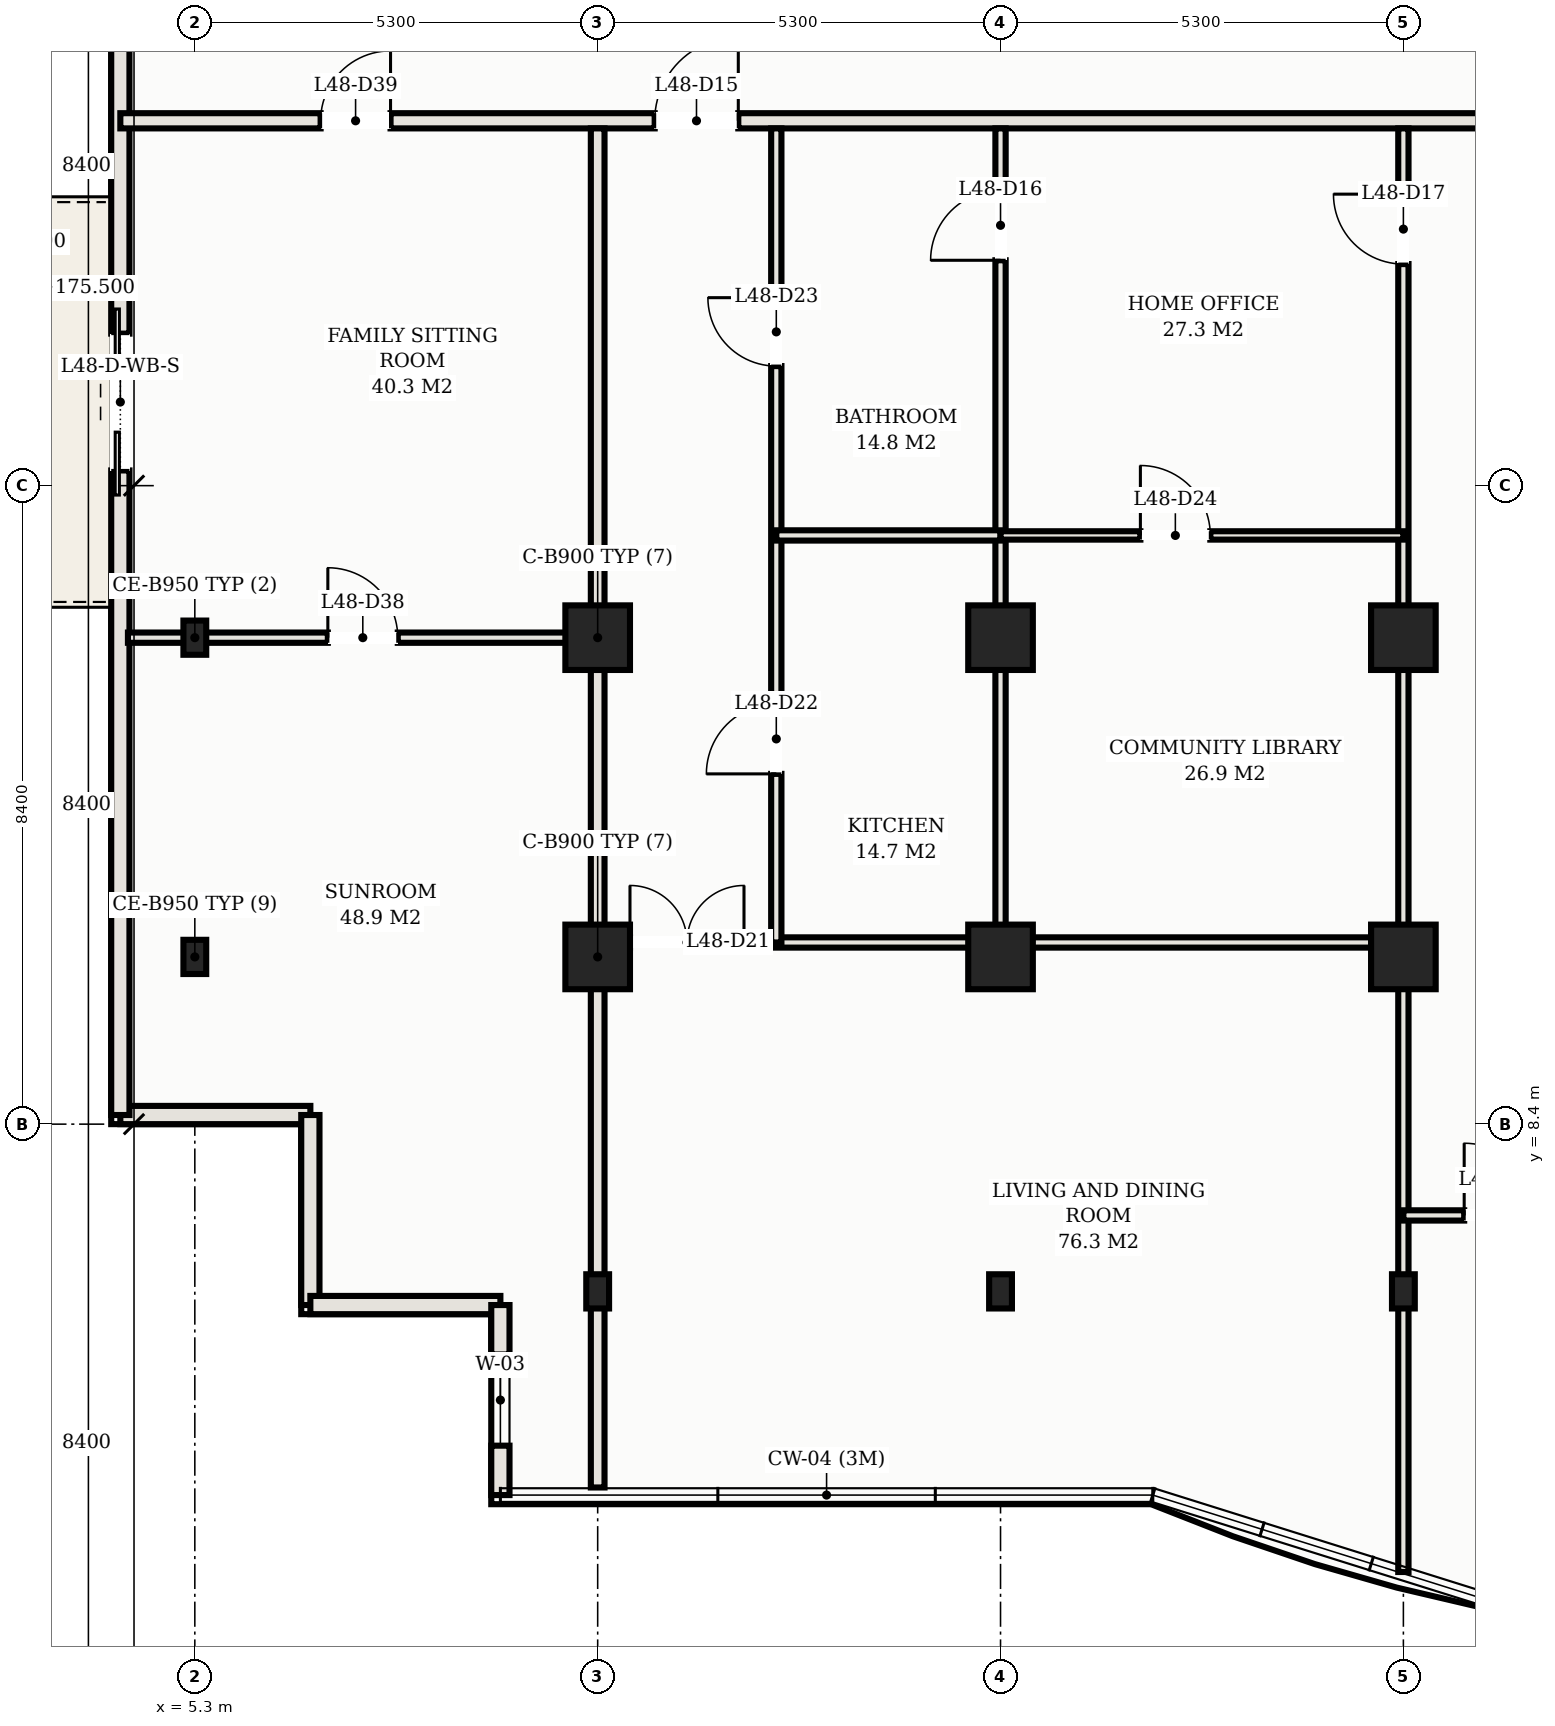
"""IFC4 building model, lengths in metres.
Left out: names, types, materials, properties, quantities, classifications, styles, units other than length and angle.
Written with IfcOpenShell. Run it as: python <this file> out.ifc"""

import sys

from ifc_helpers import new_model, si_unit, direction, frame, frame_2d, origin, origin_2d, place, context, subcontext, project, spatial, rectangle, hollow_rectangle, extrude, element, fill, save


model = new_model("IFC4")
c1 = context("Model", 3, precision=1e-05, world=origin(), true_north=direction((0.0, 1.0)))
c2 = subcontext(c1, "Body", "Model", "MODEL_VIEW")
j1 = project(units=[si_unit("LENGTHUNIT", "METRE"), si_unit("PLANEANGLEUNIT", "RADIAN")], contexts=[c1])
p1 = place(None, origin())
s1 = spatial("IfcSite", under=j1, at=p1, CompositionType="ELEMENT")
p2 = place(p1, origin())
s2 = spatial("IfcBuilding", under=s1, at=p2, CompositionType="ELEMENT")
p3 = place(p2, frame((0.0, 0.0, 175.5)))
s3 = spatial("IfcBuildingStorey", under=s2, at=p3, CompositionType="ELEMENT", Elevation=175.5)
for number, where, z_axis, x_axis in (
    (1, (10.6, 14.8, 0.0), (0.0, 0.0, 1.0), (1.0, 0.0, 0.0)),
    (2, (10.6, 10.6, 0.0), (0.0, 0.0, 1.0), (1.0, 0.0, 0.0)),
    (3, (15.9, 14.8, 0.0), (0.0, 0.0, 1.0), (1.0, 0.0, 0.0)),
    (4, (15.9, 10.6, 0.0), (0.0, 0.0, 1.0), (1.0, 0.0, 0.0)),
    (5, (21.2, 14.8, 0.0), (0.0, 0.0, 1.0), (1.0, 0.0, 0.0)),
    (6, (21.2, 10.6, 0.0), (0.0, 0.0, 1.0), (1.0, 0.0, 0.0)),
):
    element("IfcColumn", number, at=place(p3, frame(where, z_axis=z_axis, x_axis=x_axis)), inside=s3, PredefinedType="COLUMN", context=c2, shape_type="SweptSolid", body=[
        extrude(hollow_rectangle(XDim=0.85, YDim=0.85, WallThickness=0.028, at=origin_2d()), origin(), (0.0, 0.0, 1.0), 3.3),
    ])
for number, where, z_axis, x_axis in (
    (7, (10.6, 6.2, 0.0), (0.0, 0.0, 1.0), (1.0, 0.0, 0.0)),
    (8, (15.9, 6.2, 0.0), (0.0, 0.0, 1.0), (1.0, 0.0, 0.0)),
    (9, (21.2, 6.2, 0.0), (0.0, 0.0, 1.0), (1.0, 0.0, 0.0)),
    (10, (5.3, 10.6, 0.0), (0.0, 0.0, 1.0), (1.0, 0.0, 0.0)),
    (11, (5.3, 14.8, 0.0), (0.0, 0.0, 1.0), (1.0, 0.0, 0.0)),
):
    element("IfcColumn", number, at=place(p3, frame(where, z_axis=z_axis, x_axis=x_axis)), inside=s3, PredefinedType="COLUMN", context=c2, shape_type="SweptSolid", body=[
        extrude(hollow_rectangle(XDim=0.3, YDim=0.45, WallThickness=0.016, at=origin_2d()), origin(), (0.0, 0.0, 1.0), 3.3),
    ])
for number, where, z_axis, x_axis in (
    (12, (4.32, 8.52, 0.0), (0.0, 0.0, 1.0), (1.0, 0.0, 0.0)),
    (13, (6.82, 8.52, 0.0), (0.0, 0.0, 1.0), (0.0, -1.0, 0.0)),
    (14, (6.82, 6.02, 0.0), (0.0, 0.0, 1.0), (1.0, 0.0, 0.0)),
):
    element("IfcWall", number, at=place(p3, frame(where, z_axis=z_axis, x_axis=x_axis)), inside=s3, PredefinedType="SOLIDWALL", context=c2, shape_type="SweptSolid", body=[
        extrude(rectangle(XDim=2.5, YDim=0.24, at=frame_2d((1.25, 0.0))), origin(), (0.0, 0.0, 1.0), 3.1),
    ])
p4 = place(p3, frame((9.32, 6.02, 0.0), z_axis=(0.0, 0.0, 1.0), x_axis=(0.0, -1.0, 0.0)))
e15 = element("IfcWall", 15, at=p4, inside=s3, PredefinedType="SOLIDWALL", context=c2, shape_type="SweptSolid", body=[
    extrude(rectangle(XDim=2.5, YDim=0.24, at=frame_2d((1.25, 0.0))), origin(), (0.0, 0.0, 1.0), 3.1),
])
p5 = place(p4, frame((0.65, 0.0, 0.75)))
e16 = element("IfcOpeningElement", 16, at=p5, cuts=e15, PredefinedType="OPENING", context=c2, shape_type="SweptSolid", body=[
    extrude(rectangle(XDim=1.2, YDim=1.5, at=frame_2d((0.6, 0.75))), frame((0.0, 0.13, 0.0), z_axis=(0.0, -1.0, 0.0), x_axis=(1.0, 0.0, 0.0)), (0.0, 0.0, 1.0), 0.26),
])
p6 = place(p3, frame((4.32, 35.93, 0.0), z_axis=(0.0, 0.0, 1.0), x_axis=(0.0, -1.0, 0.0)))
e17 = element("IfcWall", 17, at=p6, inside=s3, PredefinedType="SOLIDWALL", context=c2, shape_type="SweptSolid", body=[
    extrude(rectangle(XDim=27.41, YDim=0.24, at=frame_2d((13.705, 0.0))), origin(), (0.0, 0.0, 1.0), 3.1),
])
p7 = place(p6, frame((17.13, 0.0, 0.0)))
e18 = element("IfcOpeningElement", 18, at=p7, cuts=e17, PredefinedType="OPENING", context=c2, shape_type="SweptSolid", body=[
    extrude(rectangle(XDim=1.8, YDim=2.2, at=frame_2d((0.9, 1.1))), frame((0.0, 0.13, 0.0), z_axis=(0.0, -1.0, 0.0), x_axis=(1.0, 0.0, 0.0)), (0.0, 0.0, 1.0), 0.26),
])
p8 = place(p3, frame((4.32, 21.6, 0.0), z_axis=(0.0, 0.0, 1.0), x_axis=(1.0, 0.0, 0.0)))
e19 = element("IfcWall", 19, at=p8, inside=s3, PredefinedType="PARTITIONING", context=c2, shape_type="SweptSolid", body=[
    extrude(rectangle(XDim=44.36, YDim=0.2, at=frame_2d((22.18, 0.0))), origin(), (0.0, 0.0, 1.0), 2.38),
])
p9 = place(p8, frame((7.03, 0.0, 0.0)))
e20 = element("IfcOpeningElement", 20, at=p9, cuts=e19, PredefinedType="OPENING", context=c2, shape_type="SweptSolid", body=[
    extrude(rectangle(XDim=1.1, YDim=2.25, at=frame_2d((0.55, 1.125))), frame((0.0, 0.11, 0.0), z_axis=(0.0, -1.0, 0.0), x_axis=(1.0, 0.0, 0.0)), (0.0, 0.0, 1.0), 0.22),
])
p10 = place(p8, frame((2.635, 0.0, 0.0)))
e21 = element("IfcOpeningElement", 21, at=p10, cuts=e19, PredefinedType="OPENING", context=c2, shape_type="SweptSolid", body=[
    extrude(rectangle(XDim=0.92, YDim=2.15, at=frame_2d((0.46, 1.075))), frame((0.0, 0.11, 0.0), z_axis=(0.0, -1.0, 0.0), x_axis=(1.0, 0.0, 0.0)), (0.0, 0.0, 1.0), 0.22),
])
p11 = place(p8, frame((40.805, 0.0, 0.0)))
e22 = element("IfcOpeningElement", 22, at=p11, cuts=e19, PredefinedType="OPENING", context=c2, shape_type="SweptSolid", body=[
    extrude(rectangle(XDim=0.92, YDim=2.15, at=frame_2d((0.46, 1.075))), frame((0.0, 0.11, 0.0), z_axis=(0.0, -1.0, 0.0), x_axis=(1.0, 0.0, 0.0)), (0.0, 0.0, 1.0), 0.22),
])
p12 = place(p3, frame((10.6, 3.62, 0.0), z_axis=(0.0, 0.0, 1.0), x_axis=(0.0, 1.0, 0.0)))
e23 = element("IfcWall", 23, at=p12, inside=s3, PredefinedType="PARTITIONING", context=c2, shape_type="SweptSolid", body=[
    extrude(rectangle(XDim=17.88, YDim=0.18, at=frame_2d((8.94, 0.0))), origin(), (0.0, 0.0, 1.0), 2.38),
])
p13 = place(p3, frame((15.9, 14.8, 0.0), z_axis=(0.0, 0.0, 1.0), x_axis=(0.0, 1.0, 0.0)))
e24 = element("IfcWall", 24, at=p13, inside=s3, PredefinedType="PARTITIONING", context=c2, shape_type="SweptSolid", body=[
    extrude(rectangle(XDim=6.7, YDim=0.135, at=frame_2d((3.35, 0.0))), origin(), (0.0, 0.0, 1.0), 2.38),
])
p14 = place(p13, frame((4.965, 0.0, 0.0)))
e25 = element("IfcOpeningElement", 25, at=p14, cuts=e24, PredefinedType="OPENING", context=c2, shape_type="SweptSolid", body=[
    extrude(rectangle(XDim=0.92, YDim=2.15, at=frame_2d((0.46, 1.075))), frame((0.0, 0.078, 0.0), z_axis=(0.0, -1.0, 0.0), x_axis=(1.0, 0.0, 0.0)), (0.0, 0.0, 1.0), 0.155),
])
p15 = place(p3, frame((21.2, 2.508, 0.0), z_axis=(0.0, 0.0, 1.0), x_axis=(0.0, 1.0, 0.0)))
e26 = element("IfcWall", 26, at=p15, inside=s3, PredefinedType="PARTITIONING", context=c2, shape_type="SweptSolid", body=[
    extrude(rectangle(XDim=18.992, YDim=0.135, at=frame_2d((9.496, 0.0))), origin(), (0.0, 0.0, 1.0), 2.38),
])
p16 = place(p15, frame((17.207, 0.0, 0.0)))
e27 = element("IfcOpeningElement", 27, at=p16, cuts=e26, PredefinedType="OPENING", context=c2, shape_type="SweptSolid", body=[
    extrude(rectangle(XDim=0.92, YDim=2.15, at=frame_2d((0.46, 1.075))), frame((0.0, 0.078, 0.0), z_axis=(0.0, -1.0, 0.0), x_axis=(1.0, 0.0, 0.0)), (0.0, 0.0, 1.0), 0.155),
])
p17 = place(p3, frame((15.9, 10.79, 0.0), z_axis=(0.0, 0.0, 1.0), x_axis=(0.0, 1.0, 0.0)))
e28 = element("IfcWall", 28, at=p17, inside=s3, PredefinedType="PARTITIONING", context=c2, shape_type="SweptSolid", body=[
    extrude(rectangle(XDim=4.01, YDim=0.135, at=frame_2d((2.005, 0.0))), origin(), (0.0, 0.0, 1.0), 2.38),
])
p18 = place(p3, frame((10.6, 10.79, 0.0), z_axis=(0.0, 0.0, 1.0), x_axis=(1.0, 0.0, 0.0)))
e29 = element("IfcWall", 29, at=p18, inside=s3, PredefinedType="PARTITIONING", context=c2, shape_type="SweptSolid", body=[
    extrude(rectangle(XDim=10.6, YDim=0.135, at=frame_2d((5.3, 0.0))), origin(), (0.0, 0.0, 1.0), 2.38),
])
p19 = place(p18, frame((0.425, 0.0, 0.0)))
e30 = element("IfcOpeningElement", 30, at=p19, cuts=e29, PredefinedType="OPENING", context=c2, shape_type="SweptSolid", body=[
    extrude(rectangle(XDim=1.5, YDim=2.25, at=frame_2d((0.75, 1.125))), frame((0.0, 0.078, 0.0), z_axis=(0.0, -1.0, 0.0), x_axis=(1.0, 0.0, 0.0)), (0.0, 0.0, 1.0), 0.155),
])
p20 = place(p3, frame((12.95, 10.79, 0.0), z_axis=(0.0, 0.0, 1.0), x_axis=(0.0, 1.0, 0.0)))
e31 = element("IfcWall", 31, at=p20, inside=s3, PredefinedType="PARTITIONING", context=c2, shape_type="SweptSolid", body=[
    extrude(rectangle(XDim=10.71, YDim=0.135, at=frame_2d((5.355, 0.0))), origin(), (0.0, 0.0, 1.0), 2.38),
])
p21 = place(p20, frame((2.218, 0.0, 0.0)))
e32 = element("IfcOpeningElement", 32, at=p21, cuts=e31, PredefinedType="OPENING", context=c2, shape_type="SweptSolid", body=[
    extrude(rectangle(XDim=0.92, YDim=2.15, at=frame_2d((0.46, 1.075))), frame((0.0, 0.078, 0.0), z_axis=(0.0, -1.0, 0.0), x_axis=(1.0, 0.0, 0.0)), (0.0, 0.0, 1.0), 0.155),
])
p22 = place(p20, frame((7.583, 0.0, 0.0)))
e33 = element("IfcOpeningElement", 33, at=p22, cuts=e31, PredefinedType="OPENING", context=c2, shape_type="SweptSolid", body=[
    extrude(rectangle(XDim=0.9, YDim=2.15, at=frame_2d((0.45, 1.075))), frame((0.0, 0.078, 0.0), z_axis=(0.0, -1.0, 0.0), x_axis=(1.0, 0.0, 0.0)), (0.0, 0.0, 1.0), 0.155),
])
p23 = place(p3, frame((12.95, 16.145, 0.0), z_axis=(0.0, 0.0, 1.0), x_axis=(1.0, 0.0, 0.0)))
e34 = element("IfcWall", 34, at=p23, inside=s3, PredefinedType="PARTITIONING", context=c2, shape_type="SweptSolid", body=[
    extrude(rectangle(XDim=2.95, YDim=0.135, at=frame_2d((1.475, 0.0))), origin(), (0.0, 0.0, 1.0), 2.38),
])
p24 = place(p3, frame((15.9, 16.145, 0.0), z_axis=(0.0, 0.0, 1.0), x_axis=(1.0, 0.0, 0.0)))
e35 = element("IfcWall", 35, at=p24, inside=s3, PredefinedType="MOVABLE", context=c2, shape_type="SweptSolid", body=[
    extrude(rectangle(XDim=5.3, YDim=0.11, at=frame_2d((2.65, 0.0))), origin(), (0.0, 0.0, 1.0), 2.38),
])
p25 = place(p24, frame((1.84, 0.0, 0.0)))
e36 = element("IfcOpeningElement", 36, at=p25, cuts=e35, PredefinedType="OPENING", context=c2, shape_type="SweptSolid", body=[
    extrude(rectangle(XDim=0.92, YDim=2.15, at=frame_2d((0.46, 1.075))), frame((0.0, 0.065, 0.0), z_axis=(0.0, -1.0, 0.0), x_axis=(1.0, 0.0, 0.0)), (0.0, 0.0, 1.0), 0.13),
])
p26 = place(p3, frame((21.2, 7.199, 0.0), z_axis=(0.0, 0.0, 1.0), x_axis=(1.0, 0.0, 0.0)))
e37 = element("IfcWall", 37, at=p26, inside=s3, PredefinedType="PARTITIONING", context=c2, shape_type="SweptSolid", body=[
    extrude(rectangle(XDim=5.3, YDim=0.135, at=frame_2d((2.65, 0.0))), origin(), (0.0, 0.0, 1.0), 2.38),
])
p27 = place(p26, frame((0.8, 0.0, 0.0)))
e38 = element("IfcOpeningElement", 38, at=p27, cuts=e37, PredefinedType="OPENING", context=c2, shape_type="SweptSolid", body=[
    extrude(rectangle(XDim=0.95, YDim=2.15, at=frame_2d((0.475, 1.075))), frame((0.0, 0.078, 0.0), z_axis=(0.0, -1.0, 0.0), x_axis=(1.0, 0.0, 0.0)), (0.0, 0.0, 1.0), 0.155),
])
p28 = place(p26, frame((3.075, 0.0, 0.0)))
e39 = element("IfcOpeningElement", 39, at=p28, cuts=e37, PredefinedType="OPENING", context=c2, shape_type="SweptSolid", body=[
    extrude(rectangle(XDim=0.9, YDim=2.15, at=frame_2d((0.45, 1.075))), frame((0.0, 0.078, 0.0), z_axis=(0.0, -1.0, 0.0), x_axis=(1.0, 0.0, 0.0)), (0.0, 0.0, 1.0), 0.155),
])
p29 = place(p3, frame((4.42, 14.8, 0.0), z_axis=(0.0, 0.0, 1.0), x_axis=(1.0, 0.0, 0.0)))
e40 = element("IfcWall", 40, at=p29, inside=s3, PredefinedType="PARTITIONING", context=c2, shape_type="SweptSolid", body=[
    extrude(rectangle(XDim=6.18, YDim=0.135, at=frame_2d((3.09, 0.0))), origin(), (0.0, 0.0, 1.0), 2.38),
])
p30 = place(p29, frame((2.63, 0.0, 0.0)))
e41 = element("IfcOpeningElement", 41, at=p30, cuts=e40, PredefinedType="OPENING", context=c2, shape_type="SweptSolid", body=[
    extrude(rectangle(XDim=0.92, YDim=2.15, at=frame_2d((0.46, 1.075))), frame((0.0, 0.078, 0.0), z_axis=(0.0, -1.0, 0.0), x_axis=(1.0, 0.0, 0.0)), (0.0, 0.0, 1.0), 0.155),
])
p31 = place(p5, origin())
e42 = element("IfcWindow", 42, at=p31, inside=s3, PartitioningType="SINGLE_PANEL", PredefinedType="WINDOW", context=c2, shape_type="SweptSolid", body=[
    extrude(rectangle(XDim=1.2, YDim=1.5, at=frame_2d((0.6, 0.75))), frame((0.0, 0.03, 0.0), z_axis=(0.0, -1.0, 0.0), x_axis=(1.0, 0.0, 0.0)), (0.0, 0.0, 1.0), 0.06),
])
fill(e16, e42)
p32 = place(p7, frame((1.8, 0.0, 0.0), z_axis=(0.0, 0.0, 1.0), x_axis=(-1.0, 0.0, 0.0)))
e43 = element("IfcDoor", 43, at=p32, inside=s3, OperationType="DOUBLE_DOOR_SLIDING", PredefinedType="DOOR", context=c2, shape_type="SweptSolid", body=[
    extrude(rectangle(XDim=1.8, YDim=2.2, at=frame_2d((0.9, 1.1))), frame((0.0, 0.025, 0.0), z_axis=(0.0, -1.0, 0.0), x_axis=(1.0, 0.0, 0.0)), (0.0, 0.0, 1.0), 0.05),
])
fill(e18, e43)
p33 = place(p9, origin())
e44 = element("IfcDoor", 44, at=p33, inside=s3, OperationType="SINGLE_SWING_RIGHT", PredefinedType="DOOR", context=c2, shape_type="SweptSolid", body=[
    extrude(rectangle(XDim=1.1, YDim=2.25, at=frame_2d((0.55, 1.125))), frame((0.0, 0.025, 0.0), z_axis=(0.0, -1.0, 0.0), x_axis=(1.0, 0.0, 0.0)), (0.0, 0.0, 1.0), 0.05),
])
fill(e20, e44)
p34 = place(p14, origin())
e45 = element("IfcDoor", 45, at=p34, inside=s3, OperationType="SINGLE_SWING_LEFT", PredefinedType="DOOR", context=c2, shape_type="SweptSolid", body=[
    extrude(rectangle(XDim=0.92, YDim=2.15, at=frame_2d((0.46, 1.075))), frame((0.0, 0.025, 0.0), z_axis=(0.0, -1.0, 0.0), x_axis=(1.0, 0.0, 0.0)), (0.0, 0.0, 1.0), 0.05),
])
fill(e25, e45)
p35 = place(p16, origin())
e46 = element("IfcDoor", 46, at=p35, inside=s3, OperationType="SINGLE_SWING_RIGHT", PredefinedType="DOOR", context=c2, shape_type="SweptSolid", body=[
    extrude(rectangle(XDim=0.92, YDim=2.15, at=frame_2d((0.46, 1.075))), frame((0.0, 0.025, 0.0), z_axis=(0.0, -1.0, 0.0), x_axis=(1.0, 0.0, 0.0)), (0.0, 0.0, 1.0), 0.05),
])
fill(e27, e46)
p36 = place(p19, origin())
e47 = element("IfcDoor", 47, at=p36, inside=s3, OperationType="DOUBLE_DOOR_SINGLE_SWING", PredefinedType="DOOR", context=c2, shape_type="SweptSolid", body=[
    extrude(rectangle(XDim=1.5, YDim=2.25, at=frame_2d((0.75, 1.125))), frame((0.0, 0.025, 0.0), z_axis=(0.0, -1.0, 0.0), x_axis=(1.0, 0.0, 0.0)), (0.0, 0.0, 1.0), 0.05),
])
fill(e30, e47)
p37 = place(p21, origin())
e48 = element("IfcDoor", 48, at=p37, inside=s3, OperationType="SINGLE_SWING_LEFT", PredefinedType="DOOR", context=c2, shape_type="SweptSolid", body=[
    extrude(rectangle(XDim=0.92, YDim=2.15, at=frame_2d((0.46, 1.075))), frame((0.0, 0.025, 0.0), z_axis=(0.0, -1.0, 0.0), x_axis=(1.0, 0.0, 0.0)), (0.0, 0.0, 1.0), 0.05),
])
fill(e32, e48)
p38 = place(p22, origin())
e49 = element("IfcDoor", 49, at=p38, inside=s3, OperationType="SINGLE_SWING_RIGHT", PredefinedType="DOOR", context=c2, shape_type="SweptSolid", body=[
    extrude(rectangle(XDim=0.9, YDim=2.15, at=frame_2d((0.45, 1.075))), frame((0.0, 0.025, 0.0), z_axis=(0.0, -1.0, 0.0), x_axis=(1.0, 0.0, 0.0)), (0.0, 0.0, 1.0), 0.05),
])
fill(e33, e49)
p39 = place(p25, origin())
e50 = element("IfcDoor", 50, at=p39, inside=s3, OperationType="SINGLE_SWING_LEFT", PredefinedType="DOOR", context=c2, shape_type="SweptSolid", body=[
    extrude(rectangle(XDim=0.92, YDim=2.15, at=frame_2d((0.46, 1.075))), frame((0.0, 0.025, 0.0), z_axis=(0.0, -1.0, 0.0), x_axis=(1.0, 0.0, 0.0)), (0.0, 0.0, 1.0), 0.05),
])
fill(e36, e50)
p40 = place(p27, origin())
e51 = element("IfcDoor", 51, at=p40, inside=s3, OperationType="SINGLE_SWING_LEFT", PredefinedType="DOOR", context=c2, shape_type="SweptSolid", body=[
    extrude(rectangle(XDim=0.95, YDim=2.15, at=frame_2d((0.475, 1.075))), frame((0.0, 0.025, 0.0), z_axis=(0.0, -1.0, 0.0), x_axis=(1.0, 0.0, 0.0)), (0.0, 0.0, 1.0), 0.05),
])
fill(e38, e51)
p41 = place(p30, origin())
e52 = element("IfcDoor", 52, at=p41, inside=s3, OperationType="SINGLE_SWING_LEFT", PredefinedType="DOOR", context=c2, shape_type="SweptSolid", body=[
    extrude(rectangle(XDim=0.92, YDim=2.15, at=frame_2d((0.46, 1.075))), frame((0.0, 0.025, 0.0), z_axis=(0.0, -1.0, 0.0), x_axis=(1.0, 0.0, 0.0)), (0.0, 0.0, 1.0), 0.05),
])
fill(e41, e52)
p42 = place(p10, origin())
e53 = element("IfcDoor", 53, at=p42, inside=s3, OperationType="SINGLE_SWING_RIGHT", PredefinedType="DOOR", context=c2, shape_type="SweptSolid", body=[
    extrude(rectangle(XDim=0.92, YDim=2.15, at=frame_2d((0.46, 1.075))), frame((0.0, 0.025, 0.0), z_axis=(0.0, -1.0, 0.0), x_axis=(1.0, 0.0, 0.0)), (0.0, 0.0, 1.0), 0.05),
])
fill(e21, e53)
save(model, sys.argv[1])
